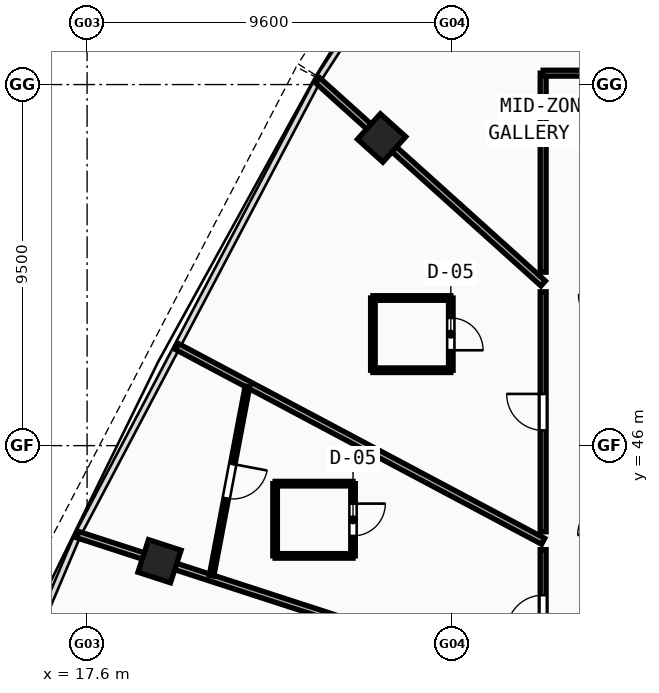
"""IFC4 building model, lengths in metres.
Left out: names, types, materials, properties, quantities, classifications, styles, units other than length and angle.
Written with IfcOpenShell. Run it as: python <this file> out.ifc"""

import sys

from ifc_helpers import new_model, si_unit, direction, frame, frame_2d, origin, origin_with_axes, origin_2d, place, context, subcontext, project, spatial, rectangle, hollow_rectangle, extrude, source, transform, mapped, element, fill, save


model = new_model("IFC4")
c1 = context("Model", 3, precision=1e-05, world=origin(), true_north=direction((0.0, 1.0)))
c2 = subcontext(c1, "Body", "Model", "MODEL_VIEW")
j1 = project(units=[si_unit("LENGTHUNIT", "METRE"), si_unit("PLANEANGLEUNIT", "RADIAN")], contexts=[c1])
p1 = place(None, origin())
s1 = spatial("IfcSite", under=j1, at=p1, CompositionType="ELEMENT")
p2 = place(p1, origin())
s2 = spatial("IfcBuilding", under=s1, at=p2, CompositionType="ELEMENT")
p3 = place(p2, frame((0.0, 0.0, 180.96)))
s3 = spatial("IfcBuildingStorey", under=s2, at=p3, CompositionType="ELEMENT", Elevation=180.96)
m1 = source(origin(), c2, "Body", "SweptSolid", [
    extrude(hollow_rectangle(XDim=0.9, YDim=0.9, WallThickness=0.036, at=origin_2d()), origin(), (0.0, 0.0, 1.0), 3.8),
])
for number, where, z_axis, x_axis in (
    (1, (25.349, 54.095, -0.26), (0.0, 0.0, 1.0), (-0.669, -0.743, 0.0)),
    (2, (19.505, 42.958, -0.26), (0.0, 0.0, 1.0), (-0.309, -0.951, 0.0)),
):
    element("IfcColumn", number, at=place(p3, frame(where, z_axis=z_axis, x_axis=x_axis)), inside=s3, PredefinedType="COLUMN", context=c2, shape_type="MappedRepresentation", body=[
        mapped(m1, transform((0.0, 0.0, 0.0), scale=1.0)),
    ])
p4 = place(p3, frame((29.6, 50.267, 0.0), z_axis=(0.0, 0.0, 1.0), x_axis=(-0.743139097079, 0.669136968335, 0.0)))
e3 = element("IfcWall", 3, at=p4, inside=s3, PredefinedType="PARTITIONING", context=c2, shape_type="SweptSolid", body=[
    extrude(rectangle(XDim=7.987, YDim=0.175, at=frame_2d((3.994, 0.0))), origin(), (0.0, 0.0, 1.0), 2.89),
])
p5 = place(p3, frame((29.6, 43.483, 0.0), z_axis=(0.0, 0.0, 1.0), x_axis=(-0.882940086537, 0.469485679853, 0.0)))
e4 = element("IfcWall", 4, at=p5, inside=s3, PredefinedType="PARTITIONING", context=c2, shape_type="SweptSolid", body=[
    extrude(rectangle(XDim=10.91, YDim=0.175, at=frame_2d((5.455, 0.0))), origin(), (0.0, 0.0, 1.0), 2.89),
])
p6 = place(p3, frame((29.6, 39.678, 0.0), z_axis=(0.0, 0.0, 1.0), x_axis=(-0.951054689993, 0.309022615097, 0.0)))
e5 = element("IfcWall", 5, at=p6, inside=s3, PredefinedType="PARTITIONING", context=c2, shape_type="SweptSolid", body=[
    extrude(rectangle(XDim=12.875, YDim=0.175, at=frame_2d((6.438, 0.0))), origin(), (0.0, 0.0, 1.0), 2.89),
])
p7 = place(p3, frame((29.6, 39.91, 0.0), z_axis=(0.0, 0.0, 1.0), x_axis=(0.0, 1.0, 0.0)))
e6 = element("IfcWall", 6, at=p7, inside=s3, PredefinedType="PARTITIONING", context=c2, shape_type="SweptSolid", body=[
    extrude(rectangle(XDim=3.354, YDim=0.155, at=frame_2d((1.677, 0.0))), origin(), (0.0, 0.0, 1.0), 3.54),
])
p8 = place(p7, frame((1.196, 0.0, 0.0)))
e7 = element("IfcOpeningElement", 7, at=p8, cuts=e6, PredefinedType="OPENING", context=c2, shape_type="SweptSolid", body=[
    extrude(rectangle(XDim=0.96, YDim=2.12, at=frame_2d((0.48, 1.06))), frame((0.0, 0.087, 0.0), z_axis=(0.0, -1.0, 0.0), x_axis=(1.0, 0.0, 0.0)), (0.0, 0.0, 1.0), 0.175),
])
p9 = place(p3, frame((29.6, 43.733, 0.0), z_axis=(0.0, 0.0, 1.0), x_axis=(0.0, 1.0, 0.0)))
e8 = element("IfcWall", 8, at=p9, inside=s3, PredefinedType="PARTITIONING", context=c2, shape_type="SweptSolid", body=[
    extrude(rectangle(XDim=6.315, YDim=0.155, at=frame_2d((3.157, 0.0))), origin(), (0.0, 0.0, 1.0), 2.89),
])
p10 = place(p9, frame((2.668, 0.0, 0.0)))
e9 = element("IfcOpeningElement", 9, at=p10, cuts=e8, PredefinedType="OPENING", context=c2, shape_type="SweptSolid", body=[
    extrude(rectangle(XDim=0.96, YDim=2.12, at=frame_2d((0.48, 1.06))), frame((0.0, 0.087, 0.0), z_axis=(0.0, -1.0, 0.0), x_axis=(1.0, 0.0, 0.0)), (0.0, 0.0, 1.0), 0.175),
])
p11 = place(p3, frame((29.6, 50.563, 0.0), z_axis=(0.0, 0.0, 1.0), x_axis=(0.0, 1.0, 0.0)))
e10 = element("IfcWall", 10, at=p11, inside=s3, PredefinedType="PARTITIONING", context=c2, shape_type="SweptSolid", body=[
    extrude(rectangle(XDim=5.237, YDim=0.155, at=frame_2d((2.618, 0.0))), origin(), (0.0, 0.0, 1.0), 3.54),
])
p12 = place(p3, frame((29.6, 55.8, 0.0), z_axis=(0.0, 0.0, 1.0), x_axis=(1.0, 0.0, 0.0)))
e11 = element("IfcWall", 11, at=p12, inside=s3, PredefinedType="PARTITIONING", context=c2, shape_type="SweptSolid", body=[
    extrude(rectangle(XDim=14.109, YDim=0.155, at=frame_2d((7.054, 0.0))), origin(), (0.0, 0.0, 1.0), 2.89),
])
p13 = place(p12, frame((6.385, 0.0, 0.0)))
e12 = element("IfcOpeningElement", 12, at=p13, cuts=e11, PredefinedType="OPENING", context=c2, shape_type="SweptSolid", body=[
    extrude(rectangle(XDim=0.96, YDim=2.12, at=frame_2d((0.48, 1.06))), frame((0.0, 0.087, 0.0), z_axis=(0.0, -1.0, 0.0), x_axis=(1.0, 0.0, 0.0)), (0.0, 0.0, 1.0), 0.175),
])
p14 = place(p3, frame((25.12, 47.984, 0.0), z_axis=(0.0, 0.0, 1.0), x_axis=(1.0, 0.0, 0.0)))
e13 = element("IfcWall", 13, at=p14, inside=s3, PredefinedType="PARTITIONING", context=c2, shape_type="SweptSolid", body=[
    extrude(rectangle(XDim=2.05, YDim=0.12, at=frame_2d((1.025, 0.0))), origin(), (0.0, 0.0, 1.0), 3.54),
])
p15 = place(p3, frame((27.17, 47.984, 0.0), z_axis=(0.0, 0.0, 1.0), x_axis=(0.0, 1.0, 0.0)))
e14 = element("IfcWall", 14, at=p15, inside=s3, PredefinedType="PARTITIONING", context=c2, shape_type="SweptSolid", body=[
    extrude(rectangle(XDim=1.9, YDim=0.12, at=frame_2d((0.95, 0.0))), origin(), (0.0, 0.0, 1.0), 3.54),
])
p16 = place(p15, frame((0.525, 0.0, 0.0)))
e15 = element("IfcOpeningElement", 15, at=p16, cuts=e14, PredefinedType="OPENING", context=c2, shape_type="SweptSolid", body=[
    extrude(rectangle(XDim=0.85, YDim=2.1, at=frame_2d((0.425, 1.05))), frame((0.0, 0.07, 0.0), z_axis=(0.0, -1.0, 0.0), x_axis=(1.0, 0.0, 0.0)), (0.0, 0.0, 1.0), 0.14),
])
p17 = place(p3, frame((27.17, 49.884, 0.0), z_axis=(0.0, 0.0, 1.0), x_axis=(-1.0, 0.0, 0.0)))
e16 = element("IfcWall", 16, at=p17, inside=s3, PredefinedType="PARTITIONING", context=c2, shape_type="SweptSolid", body=[
    extrude(rectangle(XDim=2.05, YDim=0.12, at=frame_2d((1.025, 0.0))), origin(), (0.0, 0.0, 1.0), 3.54),
])
p18 = place(p3, frame((25.12, 49.884, 0.0), z_axis=(0.0, 0.0, 1.0), x_axis=(0.0, -1.0, 0.0)))
e17 = element("IfcWall", 17, at=p18, inside=s3, PredefinedType="PARTITIONING", context=c2, shape_type="SweptSolid", body=[
    extrude(rectangle(XDim=1.9, YDim=0.12, at=frame_2d((0.95, 0.0))), origin(), (0.0, 0.0, 1.0), 3.54),
])
p19 = place(p3, frame((22.547, 43.099, 0.0), z_axis=(0.0, 0.0, 1.0), x_axis=(1.0, 0.0, 0.0)))
e18 = element("IfcWall", 18, at=p19, inside=s3, PredefinedType="PARTITIONING", context=c2, shape_type="SweptSolid", body=[
    extrude(rectangle(XDim=2.05, YDim=0.12, at=frame_2d((1.025, 0.0))), origin(), (0.0, 0.0, 1.0), 3.54),
])
p20 = place(p3, frame((24.597, 43.099, 0.0), z_axis=(0.0, 0.0, 1.0), x_axis=(0.0, 1.0, 0.0)))
e19 = element("IfcWall", 19, at=p20, inside=s3, PredefinedType="PARTITIONING", context=c2, shape_type="SweptSolid", body=[
    extrude(rectangle(XDim=1.9, YDim=0.12, at=frame_2d((0.95, 0.0))), origin(), (0.0, 0.0, 1.0), 3.54),
])
p21 = place(p20, frame((0.525, 0.0, 0.0)))
e20 = element("IfcOpeningElement", 20, at=p21, cuts=e19, PredefinedType="OPENING", context=c2, shape_type="SweptSolid", body=[
    extrude(rectangle(XDim=0.85, YDim=2.1, at=frame_2d((0.425, 1.05))), frame((0.0, 0.07, 0.0), z_axis=(0.0, -1.0, 0.0), x_axis=(1.0, 0.0, 0.0)), (0.0, 0.0, 1.0), 0.14),
])
p22 = place(p3, frame((24.597, 44.999, 0.0), z_axis=(0.0, 0.0, 1.0), x_axis=(-1.0, 0.0, 0.0)))
e21 = element("IfcWall", 21, at=p22, inside=s3, PredefinedType="PARTITIONING", context=c2, shape_type="SweptSolid", body=[
    extrude(rectangle(XDim=2.05, YDim=0.12, at=frame_2d((1.025, 0.0))), origin(), (0.0, 0.0, 1.0), 3.54),
])
p23 = place(p3, frame((22.547, 44.999, 0.0), z_axis=(0.0, 0.0, 1.0), x_axis=(0.0, -1.0, 0.0)))
e22 = element("IfcWall", 22, at=p23, inside=s3, PredefinedType="PARTITIONING", context=c2, shape_type="SweptSolid", body=[
    extrude(rectangle(XDim=1.9, YDim=0.12, at=frame_2d((0.95, 0.0))), origin(), (0.0, 0.0, 1.0), 3.54),
])
p24 = place(p3, frame((21.818, 47.553, 0.0), z_axis=(0.0, 0.0, 1.0), x_axis=(-0.186234987185, -0.982505231308, 0.0)))
e23 = element("IfcWall", 23, at=p24, inside=s3, PredefinedType="PARTITIONING", context=c2, shape_type="SweptSolid", body=[
    extrude(rectangle(XDim=5.065, YDim=0.12, at=frame_2d((2.533, 0.0))), origin(), (0.0, 0.0, 1.0), 2.89),
])
p25 = place(p24, frame((2.073, 0.0, 0.0)))
e24 = element("IfcOpeningElement", 24, at=p25, cuts=e23, PredefinedType="OPENING", context=c2, shape_type="SweptSolid", body=[
    extrude(rectangle(XDim=0.92, YDim=2.1, at=frame_2d((0.46, 1.05))), frame((0.0, 0.07, 0.0), z_axis=(0.0, -1.0, 0.0), x_axis=(1.0, 0.0, 0.0)), (0.0, 0.0, 1.0), 0.14),
])
m2 = source(origin(), c2, "Body", "SweptSolid", [
    extrude(rectangle(XDim=0.96, YDim=2.12, at=frame_2d((0.48, 1.06))), frame((0.0, 0.025, 0.0), z_axis=(0.0, -1.0, 0.0), x_axis=(1.0, 0.0, 0.0)), (0.0, 0.0, 1.0), 0.05),
])
p26 = place(p10, origin_with_axes())
e25 = element("IfcDoor", 25, at=p26, inside=s3, OperationType="SINGLE_SWING_RIGHT", PredefinedType="DOOR", context=c2, shape_type="MappedRepresentation", body=[
    mapped(m2, transform((0.0, 0.0, 0.0), scale=1.0)),
])
fill(e9, e25)
m3 = source(origin(), c2, "Body", "SweptSolid", [
    extrude(rectangle(XDim=0.85, YDim=2.1, at=frame_2d((0.425, 1.05))), frame((0.0, 0.025, 0.0), z_axis=(0.0, -1.0, 0.0), x_axis=(1.0, 0.0, 0.0)), (0.0, 0.0, 1.0), 0.05),
])
p27 = place(p16, frame((0.85, 0.0, 0.0), z_axis=(0.0, 0.0, 1.0), x_axis=(-1.0, 0.0, 0.0)))
e26 = element("IfcDoor", 26, at=p27, inside=s3, OperationType="SINGLE_SWING_RIGHT", PredefinedType="DOOR", context=c2, shape_type="MappedRepresentation", body=[
    mapped(m3, transform((0.0, 0.0, 0.0), scale=1.0)),
])
fill(e15, e26)
p28 = place(p8, origin_with_axes())
e27 = element("IfcDoor", 27, at=p28, inside=s3, OperationType="SINGLE_SWING_LEFT", PredefinedType="DOOR", context=c2, shape_type="MappedRepresentation", body=[
    mapped(m2, transform((0.0, 0.0, 0.0), scale=1.0)),
])
fill(e7, e27)
p29 = place(p21, frame((0.85, 0.0, 0.0), z_axis=(0.0, 0.0, 1.0), x_axis=(-1.0, 0.0, 0.0)))
e28 = element("IfcDoor", 28, at=p29, inside=s3, OperationType="SINGLE_SWING_LEFT", PredefinedType="DOOR", context=c2, shape_type="MappedRepresentation", body=[
    mapped(m3, transform((0.0, 0.0, 0.0), scale=1.0)),
])
fill(e20, e28)
m4 = source(origin(), c2, "Body", "SweptSolid", [
    extrude(rectangle(XDim=0.92, YDim=2.1, at=frame_2d((0.46, 1.05))), frame((0.0, 0.025, 0.0), z_axis=(0.0, -1.0, 0.0), x_axis=(1.0, 0.0, 0.0)), (0.0, 0.0, 1.0), 0.05),
])
p30 = place(p25, origin_with_axes())
e29 = element("IfcDoor", 29, at=p30, inside=s3, OperationType="SINGLE_SWING_LEFT", PredefinedType="DOOR", context=c2, shape_type="MappedRepresentation", body=[
    mapped(m4, transform((0.0, 0.0, 0.0), scale=1.0)),
])
fill(e24, e29)
save(model, sys.argv[1])
